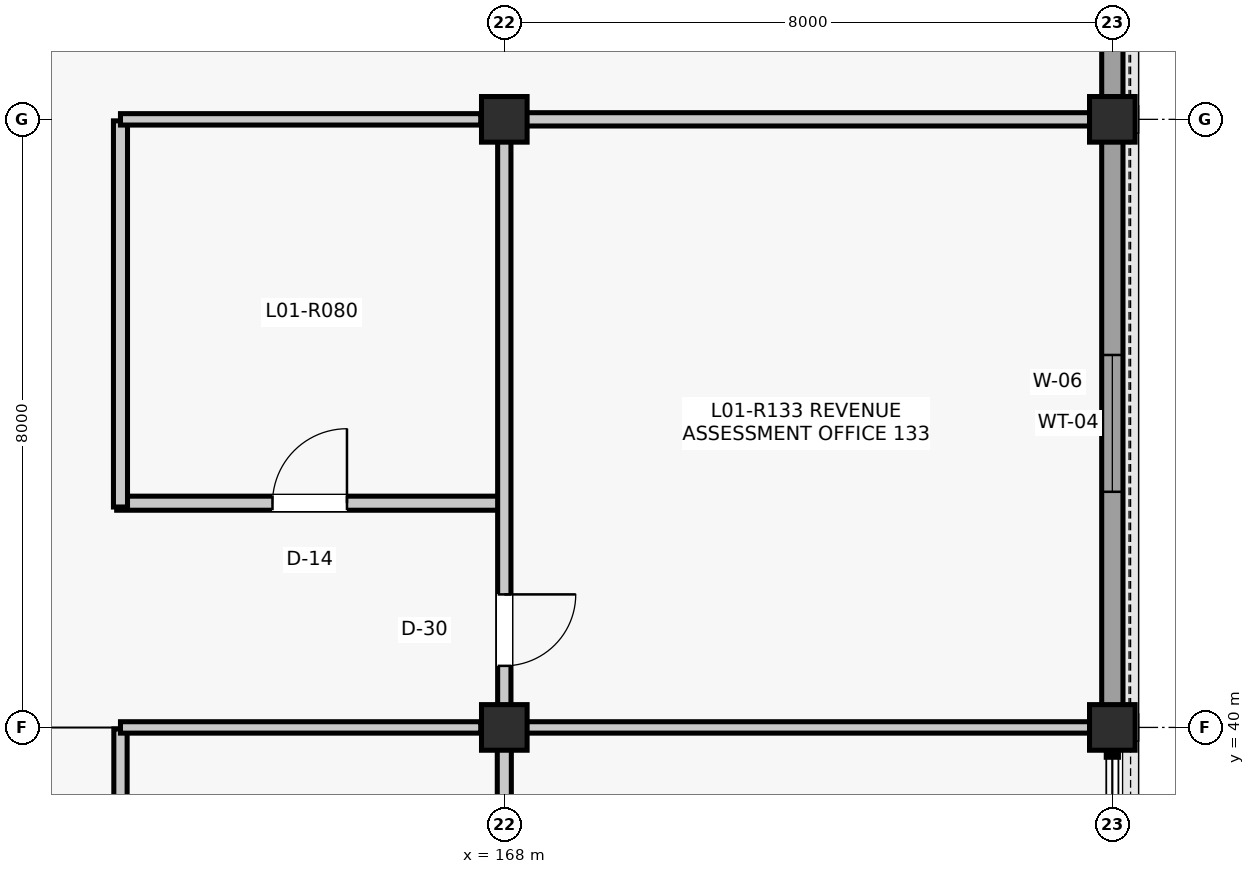
"""IFC4 building model, lengths in metres.
Left out: names, types, materials, properties, quantities, classifications, styles, units other than length and angle.
Written with IfcOpenShell. Run it as: python <this file> out.ifc"""

import sys

from ifc_helpers import new_model, si_unit, direction, frame, frame_2d, origin, origin_2d, place, context, subcontext, project, spatial, rectangle, extrude, element, fill, save


model = new_model("IFC4")
c1 = context("Model", 3, precision=1e-05, world=origin(), true_north=direction((0.0, 1.0)))
c2 = subcontext(c1, "Body", "Model", "MODEL_VIEW")
j1 = project(units=[si_unit("LENGTHUNIT", "METRE"), si_unit("PLANEANGLEUNIT", "RADIAN")], contexts=[c1])
p1 = place(None, origin())
s1 = spatial("IfcSite", under=j1, at=p1, CompositionType="ELEMENT")
p2 = place(p1, origin())
s2 = spatial("IfcBuilding", under=s1, at=p2, CompositionType="ELEMENT")
p3 = place(p2, frame((0.0, 0.0, 5.28)))
s3 = spatial("IfcBuildingStorey", under=s2, at=p3, CompositionType="ELEMENT", Elevation=5.28)
for number, where, z_axis, x_axis in (
    (1, (168.0, 40.0, 0.0), (0.0, 0.0, 1.0), (1.0, 0.0, 0.0)),
    (2, (168.0, 48.0, 0.0), (0.0, 0.0, 1.0), (1.0, 0.0, 0.0)),
    (3, (176.0, 40.0, 0.0), (0.0, 0.0, 1.0), (1.0, 0.0, 0.0)),
    (4, (176.0, 48.0, 0.0), (0.0, 0.0, 1.0), (1.0, 0.0, 0.0)),
):
    element("IfcColumn", number, at=place(p3, frame(where, z_axis=z_axis, x_axis=x_axis)), inside=s3, PredefinedType="COLUMN", context=c2, shape_type="SweptSolid", body=[
        extrude(rectangle(XDim=0.6, YDim=0.6, at=origin_2d()), origin(), (0.0, 0.0, 1.0), 4.62),
    ])
p4 = place(p3, frame((176.0, 40.285, 0.0), z_axis=(0.0, 0.0, 1.0), x_axis=(0.0, 1.0, 0.0)))
e5 = element("IfcWall", 5, at=p4, inside=s3, PredefinedType="SOLIDWALL", context=c2, shape_type="SweptSolid", body=[
    extrude(rectangle(XDim=7.43, YDim=0.28, at=frame_2d((3.715, 0.0))), origin(), (0.0, 0.0, 1.0), 3.91),
])
p5 = place(p4, frame((2.815, 0.0, 0.9)))
e6 = element("IfcOpeningElement", 6, at=p5, cuts=e5, PredefinedType="OPENING", context=c2, shape_type="SweptSolid", body=[
    extrude(rectangle(XDim=1.8, YDim=2.3, at=frame_2d((0.9, 1.15))), frame((0.0, 0.15, 0.0), z_axis=(0.0, -1.0, 0.0), x_axis=(1.0, 0.0, 0.0)), (0.0, 0.0, 1.0), 0.3),
])
p6 = place(p3, frame((176.0, 48.285, 0.0), z_axis=(0.0, 0.0, 1.0), x_axis=(0.0, 1.0, 0.0)))
e7 = element("IfcWall", 7, at=p6, inside=s3, PredefinedType="SOLIDWALL", context=c2, shape_type="SweptSolid", body=[
    extrude(rectangle(XDim=7.43, YDim=0.28, at=frame_2d((3.715, 0.0))), origin(), (0.0, 0.0, 1.0), 3.974),
])
p7 = place(p6, frame((0.737, 0.0, 0.95)))
e8 = element("IfcOpeningElement", 8, at=p7, cuts=e7, PredefinedType="OPENING", context=c2, shape_type="SweptSolid", body=[
    extrude(rectangle(XDim=1.2, YDim=1.8, at=frame_2d((0.6, 0.9))), frame((0.0, 0.15, 0.0), z_axis=(0.0, -1.0, 0.0), x_axis=(1.0, 0.0, 0.0)), (0.0, 0.0, 1.0), 0.3),
])
p8 = place(p6, frame((5.493, 0.0, 0.95)))
e9 = element("IfcOpeningElement", 9, at=p8, cuts=e7, PredefinedType="OPENING", context=c2, shape_type="SweptSolid", body=[
    extrude(rectangle(XDim=1.2, YDim=1.8, at=frame_2d((0.6, 0.9))), frame((0.0, 0.15, 0.0), z_axis=(0.0, -1.0, 0.0), x_axis=(1.0, 0.0, 0.0)), (0.0, 0.0, 1.0), 0.3),
])
p9 = place(p3, frame((162.95, 34.9, 0.0), z_axis=(0.0, 0.0, 1.0), x_axis=(0.0, 1.0, 0.0)))
e10 = element("IfcWall", 10, at=p9, inside=s3, PredefinedType="PARTITIONING", context=c2, shape_type="SweptSolid", body=[
    extrude(rectangle(XDim=5.08, YDim=0.175, at=frame_2d((2.54, 0.0))), origin(), (0.0, 0.0, 1.0), 3.787),
])
p10 = place(p3, frame((162.95, 40.0, 0.0), z_axis=(0.0, 0.0, 1.0), x_axis=(1.0, 0.0, 0.0)))
e11 = element("IfcWall", 11, at=p10, inside=s3, PredefinedType="PARTITIONING", context=c2, shape_type="SweptSolid", body=[
    extrude(rectangle(XDim=4.74, YDim=0.15, at=frame_2d((2.37, 0.0))), origin(), (0.0, 0.0, 1.0), 3.787),
])
p11 = place(p3, frame((162.9, 42.95, 0.0), z_axis=(0.0, 0.0, 1.0), x_axis=(1.0, 0.0, 0.0)))
e12 = element("IfcWall", 12, at=p11, inside=s3, PredefinedType="PARTITIONING", context=c2, shape_type="SweptSolid", body=[
    extrude(rectangle(XDim=5.08, YDim=0.185, at=frame_2d((2.54, 0.0))), origin(), (0.0, 0.0, 1.0), 3.781),
])
p12 = place(p11, frame((2.05, 0.0, 0.0)))
e13 = element("IfcOpeningElement", 13, at=p12, cuts=e12, PredefinedType="OPENING", context=c2, shape_type="SweptSolid", body=[
    extrude(rectangle(XDim=0.98, YDim=2.15, at=frame_2d((0.49, 1.075))), frame((0.0, 0.103, 0.0), z_axis=(0.0, -1.0, 0.0), x_axis=(1.0, 0.0, 0.0)), (0.0, 0.0, 1.0), 0.205),
])
p13 = place(p3, frame((162.95, 42.9, 0.0), z_axis=(0.0, 0.0, 1.0), x_axis=(0.0, 1.0, 0.0)))
e14 = element("IfcWall", 14, at=p13, inside=s3, PredefinedType="PARTITIONING", context=c2, shape_type="SweptSolid", body=[
    extrude(rectangle(XDim=5.08, YDim=0.185, at=frame_2d((2.54, 0.0))), origin(), (0.0, 0.0, 1.0), 3.771),
])
p14 = place(p3, frame((162.95, 48.0, 0.0), z_axis=(0.0, 0.0, 1.0), x_axis=(1.0, 0.0, 0.0)))
e15 = element("IfcWall", 15, at=p14, inside=s3, PredefinedType="PARTITIONING", context=c2, shape_type="SweptSolid", body=[
    extrude(rectangle(XDim=4.74, YDim=0.15, at=frame_2d((2.37, 0.0))), origin(), (0.0, 0.0, 1.0), 3.771),
])
p15 = place(p3, frame((168.0, 32.29, 0.0), z_axis=(0.0, 0.0, 1.0), x_axis=(0.0, 1.0, 0.0)))
e16 = element("IfcWall", 16, at=p15, inside=s3, PredefinedType="PARTITIONING", context=c2, shape_type="SweptSolid", body=[
    extrude(rectangle(XDim=7.42, YDim=0.185, at=frame_2d((3.71, 0.0))), origin(), (0.0, 0.0, 1.0), 3.857),
])
p16 = place(p15, frame((0.52, 0.0, 0.0)))
e17 = element("IfcOpeningElement", 17, at=p16, cuts=e16, PredefinedType="OPENING", context=c2, shape_type="SweptSolid", body=[
    extrude(rectangle(XDim=0.94, YDim=2.12, at=frame_2d((0.47, 1.06))), frame((0.0, 0.103, 0.0), z_axis=(0.0, -1.0, 0.0), x_axis=(1.0, 0.0, 0.0)), (0.0, 0.0, 1.0), 0.205),
])
p17 = place(p3, frame((168.0, 40.29, 0.0), z_axis=(0.0, 0.0, 1.0), x_axis=(0.0, 1.0, 0.0)))
e18 = element("IfcWall", 18, at=p17, inside=s3, PredefinedType="PARTITIONING", context=c2, shape_type="SweptSolid", body=[
    extrude(rectangle(XDim=7.42, YDim=0.175, at=frame_2d((3.71, 0.0))), origin(), (0.0, 0.0, 1.0), 3.781),
])
p18 = place(p17, frame((0.52, 0.0, 0.0)))
e19 = element("IfcOpeningElement", 19, at=p18, cuts=e18, PredefinedType="OPENING", context=c2, shape_type="SweptSolid", body=[
    extrude(rectangle(XDim=0.94, YDim=2.12, at=frame_2d((0.47, 1.06))), frame((0.0, 0.097, 0.0), z_axis=(0.0, -1.0, 0.0), x_axis=(1.0, 0.0, 0.0)), (0.0, 0.0, 1.0), 0.195),
])
p19 = place(p3, frame((168.29, 40.0, 0.0), z_axis=(0.0, 0.0, 1.0), x_axis=(1.0, 0.0, 0.0)))
e20 = element("IfcWall", 20, at=p19, inside=s3, PredefinedType="PARTITIONING", context=c2, shape_type="SweptSolid", body=[
    extrude(rectangle(XDim=7.42, YDim=0.15, at=frame_2d((3.71, 0.0))), origin(), (0.0, 0.0, 1.0), 3.771),
])
p20 = place(p3, frame((168.29, 48.0, 0.0), z_axis=(0.0, 0.0, 1.0), x_axis=(1.0, 0.0, 0.0)))
e21 = element("IfcWall", 21, at=p20, inside=s3, PredefinedType="PARTITIONING", context=c2, shape_type="SweptSolid", body=[
    extrude(rectangle(XDim=7.42, YDim=0.175, at=frame_2d((3.71, 0.0))), origin(), (0.0, 0.0, 1.0), 3.781),
])
p21 = place(p5, origin())
e22 = element("IfcWindow", 22, at=p21, inside=s3, PartitioningType="SINGLE_PANEL", PredefinedType="WINDOW", context=c2, shape_type="SweptSolid", body=[
    extrude(rectangle(XDim=1.8, YDim=2.3, at=frame_2d((0.9, 1.15))), frame((0.0, 0.03, 0.0), z_axis=(0.0, -1.0, 0.0), x_axis=(1.0, 0.0, 0.0)), (0.0, 0.0, 1.0), 0.06),
])
fill(e6, e22)
p22 = place(p12, origin())
e23 = element("IfcDoor", 23, at=p22, inside=s3, OperationType="SINGLE_SWING_RIGHT", PredefinedType="DOOR", context=c2, shape_type="SweptSolid", body=[
    extrude(rectangle(XDim=0.98, YDim=2.15, at=frame_2d((0.49, 1.075))), frame((0.0, 0.025, 0.0), z_axis=(0.0, -1.0, 0.0), x_axis=(1.0, 0.0, 0.0)), (0.0, 0.0, 1.0), 0.05),
])
fill(e13, e23)
p23 = place(p18, frame((0.94, 0.0, 0.0), z_axis=(0.0, 0.0, 1.0), x_axis=(-1.0, 0.0, 0.0)))
e24 = element("IfcDoor", 24, at=p23, inside=s3, OperationType="SINGLE_SWING_RIGHT", PredefinedType="DOOR", context=c2, shape_type="SweptSolid", body=[
    extrude(rectangle(XDim=0.94, YDim=2.12, at=frame_2d((0.47, 1.06))), frame((0.0, 0.025, 0.0), z_axis=(0.0, -1.0, 0.0), x_axis=(1.0, 0.0, 0.0)), (0.0, 0.0, 1.0), 0.05),
])
fill(e19, e24)
save(model, sys.argv[1])
